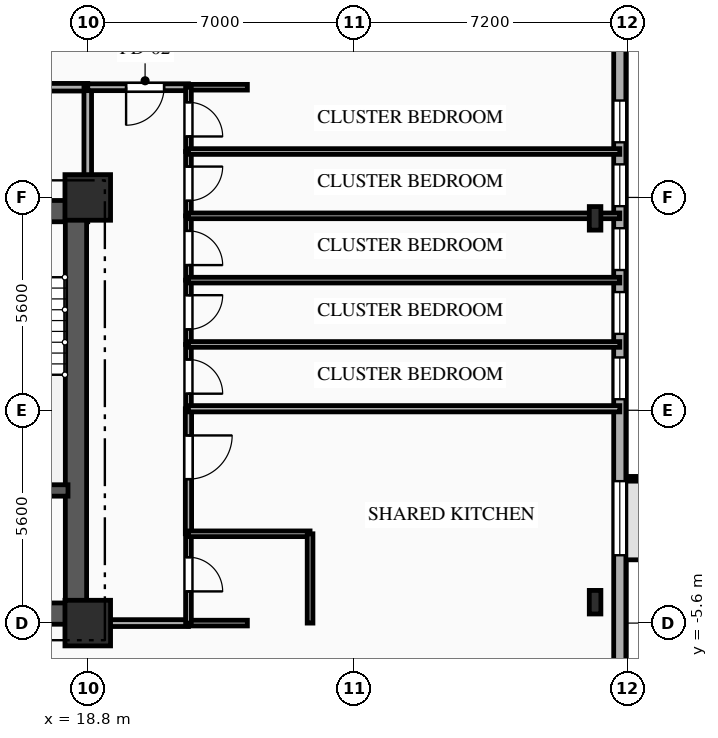
"""IFC4 building model, lengths in metres.
Left out: names, types, materials, properties, quantities, classifications, styles, units other than length and angle.
Written with IfcOpenShell. Run it as: python <this file> out.ifc"""

import sys

from ifc_helpers import new_model, si_unit, direction, frame, frame_2d, origin, origin_2d, place, context, subcontext, project, spatial, rectangle, i_section, extrude, element, fill, save


model = new_model("IFC4")
c1 = context("Model", 3, precision=1e-05, world=origin(), true_north=direction((0.0, 1.0)))
c2 = subcontext(c1, "Body", "Model", "MODEL_VIEW")
j1 = project(units=[si_unit("LENGTHUNIT", "METRE"), si_unit("PLANEANGLEUNIT", "RADIAN")], contexts=[c1])
p1 = place(None, origin())
s1 = spatial("IfcSite", under=j1, at=p1, CompositionType="ELEMENT")
p2 = place(p1, origin())
s2 = spatial("IfcBuilding", under=s1, at=p2, CompositionType="ELEMENT")
p3 = place(p2, frame((0.0, 0.0, 50.45)))
s3 = spatial("IfcBuildingStorey", under=s2, at=p3, CompositionType="ELEMENT", Elevation=50.45)
for number, where, z_axis, x_axis in (
    (1, (18.8, -5.6, 0.0), (0.0, 0.0, 1.0), (1.0, 0.0, 0.0)),
    (2, (18.8, 5.6, 0.0), (0.0, 0.0, 1.0), (1.0, 0.0, 0.0)),
):
    element("IfcColumn", number, at=place(p3, frame(where, z_axis=z_axis, x_axis=x_axis)), inside=s3, PredefinedType="COLUMN", context=c2, shape_type="SweptSolid", body=[
        extrude(rectangle(XDim=1.2, YDim=1.2, at=origin_2d()), origin(), (0.0, 0.0, 1.0), 3.35),
    ])
for number, where, z_axis, x_axis in (
    (3, (32.15, -5.05, 0.0), (0.0, 0.0, 1.0), (1.0, 0.0, 0.0)),
    (4, (32.15, 5.05, 0.0), (0.0, 0.0, 1.0), (1.0, 0.0, 0.0)),
):
    element("IfcColumn", number, at=place(p3, frame(where, z_axis=z_axis, x_axis=x_axis)), inside=s3, PredefinedType="COLUMN", context=c2, shape_type="SweptSolid", body=[
        extrude(i_section(OverallWidth=0.305, OverallDepth=0.62, WebThickness=0.021, FlangeThickness=0.04, FilletRadius=0.027, at=origin_2d()), origin(), (0.0, 0.0, 1.0), 3.35),
    ])
p4 = place(p3, frame((32.8, 15.8, 0.0), z_axis=(0.0, 0.0, 1.0), x_axis=(0.0, -1.0, 0.0)))
e5 = element("IfcWall", 5, at=p4, inside=s3, PredefinedType="SOLIDWALL", context=c2, shape_type="SweptSolid", body=[
    extrude(rectangle(XDim=31.6, YDim=0.32, at=frame_2d((15.8, 0.0))), origin(), (0.0, 0.0, 1.0), 3.035),
])
p5 = place(p4, frame((7.65, 0.0, 0.85)))
e6 = element("IfcOpeningElement", 6, at=p5, cuts=e5, PredefinedType="OPENING", context=c2, shape_type="SweptSolid", body=[
    extrude(rectangle(XDim=1.1, YDim=1.85, at=frame_2d((0.55, 0.925))), frame((0.0, 0.17, 0.0), z_axis=(0.0, -1.0, 0.0), x_axis=(1.0, 0.0, 0.0)), (0.0, 0.0, 1.0), 0.34),
])
p6 = place(p4, frame((9.33, 0.0, 0.85)))
e7 = element("IfcOpeningElement", 7, at=p6, cuts=e5, PredefinedType="OPENING", context=c2, shape_type="SweptSolid", body=[
    extrude(rectangle(XDim=1.1, YDim=1.85, at=frame_2d((0.55, 0.925))), frame((0.0, 0.17, 0.0), z_axis=(0.0, -1.0, 0.0), x_axis=(1.0, 0.0, 0.0)), (0.0, 0.0, 1.0), 0.34),
])
p7 = place(p4, frame((11.01, 0.0, 0.85)))
e8 = element("IfcOpeningElement", 8, at=p7, cuts=e5, PredefinedType="OPENING", context=c2, shape_type="SweptSolid", body=[
    extrude(rectangle(XDim=1.1, YDim=1.85, at=frame_2d((0.55, 0.925))), frame((0.0, 0.17, 0.0), z_axis=(0.0, -1.0, 0.0), x_axis=(1.0, 0.0, 0.0)), (0.0, 0.0, 1.0), 0.34),
])
p8 = place(p4, frame((12.69, 0.0, 0.85)))
e9 = element("IfcOpeningElement", 9, at=p8, cuts=e5, PredefinedType="OPENING", context=c2, shape_type="SweptSolid", body=[
    extrude(rectangle(XDim=1.1, YDim=1.85, at=frame_2d((0.55, 0.925))), frame((0.0, 0.17, 0.0), z_axis=(0.0, -1.0, 0.0), x_axis=(1.0, 0.0, 0.0)), (0.0, 0.0, 1.0), 0.34),
])
p9 = place(p4, frame((14.41, 0.0, 0.85)))
e10 = element("IfcOpeningElement", 10, at=p9, cuts=e5, PredefinedType="OPENING", context=c2, shape_type="SweptSolid", body=[
    extrude(rectangle(XDim=1.1, YDim=1.85, at=frame_2d((0.55, 0.925))), frame((0.0, 0.17, 0.0), z_axis=(0.0, -1.0, 0.0), x_axis=(1.0, 0.0, 0.0)), (0.0, 0.0, 1.0), 0.34),
])
p10 = place(p4, frame((17.665, 0.0, 0.85)))
e11 = element("IfcOpeningElement", 11, at=p10, cuts=e5, PredefinedType="OPENING", context=c2, shape_type="SweptSolid", body=[
    extrude(rectangle(XDim=1.95, YDim=1.85, at=frame_2d((0.975, 0.925))), frame((0.0, 0.17, 0.0), z_axis=(0.0, -1.0, 0.0), x_axis=(1.0, 0.0, 0.0)), (0.0, 0.0, 1.0), 0.34),
])
p11 = place(p3, frame((9.2, 5.24, 0.0), z_axis=(0.0, 0.0, 1.0), x_axis=(1.0, 0.0, 0.0)))
e12 = element("IfcWall", 12, at=p11, inside=s3, PredefinedType="SHEAR", context=c2, shape_type="SweptSolid", body=[
    extrude(rectangle(XDim=9.6, YDim=0.56, at=frame_2d((4.8, 0.0))), origin(), (0.0, 0.0, 1.0), 3.035),
])
p12 = place(p11, frame((6.95, 0.0, 0.0)))
e13 = element("IfcOpeningElement", 13, at=p12, cuts=e12, PredefinedType="OPENING", context=c2, shape_type="SweptSolid", body=[
    extrude(rectangle(XDim=1.1, YDim=2.15, at=frame_2d((0.55, 1.075))), frame((0.0, 0.29, 0.0), z_axis=(0.0, -1.0, 0.0), x_axis=(1.0, 0.0, 0.0)), (0.0, 0.0, 1.0), 0.58),
])
p13 = place(p11, frame((3.775, 0.0, 0.0)))
e14 = element("IfcOpeningElement", 14, at=p13, cuts=e12, PredefinedType="OPENING", context=c2, shape_type="SweptSolid", body=[
    extrude(rectangle(XDim=1.05, YDim=2.1, at=frame_2d((0.525, 1.05))), frame((0.0, 0.29, 0.0), z_axis=(0.0, -1.0, 0.0), x_axis=(1.0, 0.0, 0.0)), (0.0, 0.0, 1.0), 0.58),
])
p14 = place(p3, frame((9.2, -5.35, 0.0), z_axis=(0.0, 0.0, 1.0), x_axis=(1.0, 0.0, 0.0)))
e15 = element("IfcWall", 15, at=p14, inside=s3, PredefinedType="SHEAR", context=c2, shape_type="SweptSolid", body=[
    extrude(rectangle(XDim=9.6, YDim=0.56, at=frame_2d((4.8, 0.0))), origin(), (0.0, 0.0, 1.0), 3.035),
])
p15 = place(p14, frame((7.65, 0.0, 0.0)))
e16 = element("IfcOpeningElement", 16, at=p15, cuts=e15, PredefinedType="OPENING", context=c2, shape_type="SweptSolid", body=[
    extrude(rectangle(XDim=0.9, YDim=2.1, at=frame_2d((0.45, 1.05))), frame((0.0, 0.29, 0.0), z_axis=(0.0, -1.0, 0.0), x_axis=(1.0, 0.0, 0.0)), (0.0, 0.0, 1.0), 0.58),
])
p16 = place(p3, frame((18.49, -5.05, 0.0), z_axis=(0.0, 0.0, 1.0), x_axis=(0.0, 1.0, 0.0)))
e17 = element("IfcWall", 17, at=p16, inside=s3, PredefinedType="SHEAR", context=c2, shape_type="SweptSolid", body=[
    extrude(rectangle(XDim=10.1, YDim=0.56, at=frame_2d((5.05, 0.0))), origin(), (0.0, 0.0, 1.0), 3.035),
])
p17 = place(p3, frame((15.1, -2.11, 0.0), z_axis=(0.0, 0.0, 1.0), x_axis=(1.0, 0.0, 0.0)))
e18 = element("IfcWall", 18, at=p17, inside=s3, PredefinedType="SHEAR", context=c2, shape_type="SweptSolid", body=[
    extrude(rectangle(XDim=3.18, YDim=0.3, at=frame_2d((1.59, 0.0))), origin(), (0.0, 0.0, 1.0), 3.035),
])
p18 = place(p3, frame((18.8, 8.5, 0.0), z_axis=(0.0, 0.0, 1.0), x_axis=(-1.0, 0.0, 0.0)))
e19 = element("IfcWall", 19, at=p18, inside=s3, PredefinedType="PARTITIONING", context=c2, shape_type="SweptSolid", body=[
    extrude(rectangle(XDim=6.8, YDim=0.2, at=frame_2d((3.4, 0.0))), origin(), (0.0, 0.0, 1.0), 3.035),
])
p19 = place(p18, frame((3.985, 0.0, 0.0)))
e20 = element("IfcOpeningElement", 20, at=p19, cuts=e19, PredefinedType="OPENING", context=c2, shape_type="SweptSolid", body=[
    extrude(rectangle(XDim=1.1, YDim=2.15, at=frame_2d((0.55, 1.075))), frame((0.0, 0.11, 0.0), z_axis=(0.0, -1.0, 0.0), x_axis=(1.0, 0.0, 0.0)), (0.0, 0.0, 1.0), 0.22),
])
p20 = place(p3, frame((18.8, 5.6, 0.0), z_axis=(0.0, 0.0, 1.0), x_axis=(0.0, 1.0, 0.0)))
e21 = element("IfcWall", 21, at=p20, inside=s3, PredefinedType="PARTITIONING", context=c2, shape_type="SweptSolid", body=[
    extrude(rectangle(XDim=2.9, YDim=0.2, at=frame_2d((1.45, 0.0))), origin(), (0.0, 0.0, 1.0), 2.52),
])
p21 = place(p3, frame((21.45, 8.5, 0.0), z_axis=(0.0, 0.0, 1.0), x_axis=(-1.0, 0.0, 0.0)))
e22 = element("IfcWall", 22, at=p21, inside=s3, PredefinedType="PARTITIONING", context=c2, shape_type="SweptSolid", body=[
    extrude(rectangle(XDim=2.65, YDim=0.18, at=frame_2d((1.325, 0.0))), origin(), (0.0, 0.0, 1.0), 3.035),
])
p22 = place(p21, frame((0.641, 0.0, 0.0)))
e23 = element("IfcOpeningElement", 23, at=p22, cuts=e22, PredefinedType="OPENING", context=c2, shape_type="SweptSolid", body=[
    extrude(rectangle(XDim=1.0, YDim=2.15, at=frame_2d((0.5, 1.075))), frame((0.0, 0.1, 0.0), z_axis=(0.0, -1.0, 0.0), x_axis=(1.0, 0.0, 0.0)), (0.0, 0.0, 1.0), 0.2),
])
p23 = place(p3, frame((23.0, 8.5, 0.0), z_axis=(0.0, 0.0, 1.0), x_axis=(-1.0, 0.0, 0.0)))
e24 = element("IfcWall", 24, at=p23, inside=s3, PredefinedType="PARTITIONING", context=c2, shape_type="SweptSolid", body=[
    extrude(rectangle(XDim=1.55, YDim=0.15, at=frame_2d((0.775, 0.0))), origin(), (0.0, 0.0, 1.0), 3.035),
])
p24 = place(p3, frame((18.8, -5.6, 0.0), z_axis=(0.0, 0.0, 1.0), x_axis=(1.0, 0.0, 0.0)))
e25 = element("IfcWall", 25, at=p24, inside=s3, PredefinedType="PARTITIONING", context=c2, shape_type="SweptSolid", body=[
    extrude(rectangle(XDim=2.65, YDim=0.18, at=frame_2d((1.325, 0.0))), origin(), (0.0, 0.0, 1.0), 3.035),
])
p25 = place(p3, frame((21.45, -5.6, 0.0), z_axis=(0.0, 0.0, 1.0), x_axis=(1.0, 0.0, 0.0)))
e26 = element("IfcWall", 26, at=p25, inside=s3, PredefinedType="PLUMBINGWALL", context=c2, shape_type="SweptSolid", body=[
    extrude(rectangle(XDim=1.55, YDim=0.15, at=frame_2d((0.775, 0.0))), origin(), (0.0, 0.0, 1.0), 3.035),
])
p26 = place(p3, frame((21.45, -3.25, 0.0), z_axis=(0.0, 0.0, 1.0), x_axis=(0.0, -1.0, 0.0)))
e27 = element("IfcWall", 27, at=p26, inside=s3, PredefinedType="PLUMBINGWALL", context=c2, shape_type="SweptSolid", body=[
    extrude(rectangle(XDim=2.35, YDim=0.15, at=frame_2d((1.175, 0.0))), origin(), (0.0, 0.0, 1.0), 3.035),
])
p27 = place(p26, frame((0.616, 0.0, 0.0)))
e28 = element("IfcOpeningElement", 28, at=p27, cuts=e27, PredefinedType="OPENING", context=c2, shape_type="SweptSolid", body=[
    extrude(rectangle(XDim=0.9, YDim=2.1, at=frame_2d((0.45, 1.05))), frame((0.0, 0.085, 0.0), z_axis=(0.0, -1.0, 0.0), x_axis=(1.0, 0.0, 0.0)), (0.0, 0.0, 1.0), 0.17),
])
p28 = place(p3, frame((21.45, 0.04, 0.0), z_axis=(0.0, 0.0, 1.0), x_axis=(0.0, -1.0, 0.0)))
e29 = element("IfcWall", 29, at=p28, inside=s3, PredefinedType="PARTITIONING", context=c2, shape_type="SweptSolid", body=[
    extrude(rectangle(XDim=3.29, YDim=0.165, at=frame_2d((1.645, 0.0))), origin(), (0.0, 0.0, 1.0), 3.035),
])
p29 = place(p28, frame((0.702, 0.0, 0.0)))
e30 = element("IfcOpeningElement", 30, at=p29, cuts=e29, PredefinedType="OPENING", context=c2, shape_type="SweptSolid", body=[
    extrude(rectangle(XDim=1.15, YDim=2.15, at=frame_2d((0.575, 1.075))), frame((0.0, 0.093, 0.0), z_axis=(0.0, -1.0, 0.0), x_axis=(1.0, 0.0, 0.0)), (0.0, 0.0, 1.0), 0.185),
])
p30 = place(p3, frame((21.45, 1.732, 0.0), z_axis=(0.0, 0.0, 1.0), x_axis=(0.0, -1.0, 0.0)))
e31 = element("IfcWall", 31, at=p30, inside=s3, PredefinedType="PARTITIONING", context=c2, shape_type="SweptSolid", body=[
    extrude(rectangle(XDim=1.692, YDim=0.15, at=frame_2d((0.846, 0.0))), origin(), (0.0, 0.0, 1.0), 3.035),
])
p31 = place(p30, frame((0.396, 0.0, 0.0)))
e32 = element("IfcOpeningElement", 32, at=p31, cuts=e31, PredefinedType="OPENING", context=c2, shape_type="SweptSolid", body=[
    extrude(rectangle(XDim=0.9, YDim=2.1, at=frame_2d((0.45, 1.05))), frame((0.0, 0.085, 0.0), z_axis=(0.0, -1.0, 0.0), x_axis=(1.0, 0.0, 0.0)), (0.0, 0.0, 1.0), 0.17),
])
p32 = place(p3, frame((21.45, 3.424, 0.0), z_axis=(0.0, 0.0, 1.0), x_axis=(0.0, -1.0, 0.0)))
e33 = element("IfcWall", 33, at=p32, inside=s3, PredefinedType="PARTITIONING", context=c2, shape_type="SweptSolid", body=[
    extrude(rectangle(XDim=1.692, YDim=0.15, at=frame_2d((0.846, 0.0))), origin(), (0.0, 0.0, 1.0), 3.035),
])
p33 = place(p32, frame((0.396, 0.0, 0.0)))
e34 = element("IfcOpeningElement", 34, at=p33, cuts=e33, PredefinedType="OPENING", context=c2, shape_type="SweptSolid", body=[
    extrude(rectangle(XDim=0.9, YDim=2.1, at=frame_2d((0.45, 1.05))), frame((0.0, 0.085, 0.0), z_axis=(0.0, -1.0, 0.0), x_axis=(1.0, 0.0, 0.0)), (0.0, 0.0, 1.0), 0.17),
])
p34 = place(p3, frame((21.45, 5.116, 0.0), z_axis=(0.0, 0.0, 1.0), x_axis=(0.0, -1.0, 0.0)))
e35 = element("IfcWall", 35, at=p34, inside=s3, PredefinedType="PARTITIONING", context=c2, shape_type="SweptSolid", body=[
    extrude(rectangle(XDim=1.692, YDim=0.15, at=frame_2d((0.846, 0.0))), origin(), (0.0, 0.0, 1.0), 3.035),
])
p35 = place(p34, frame((0.396, 0.0, 0.0)))
e36 = element("IfcOpeningElement", 36, at=p35, cuts=e35, PredefinedType="OPENING", context=c2, shape_type="SweptSolid", body=[
    extrude(rectangle(XDim=0.9, YDim=2.1, at=frame_2d((0.45, 1.05))), frame((0.0, 0.085, 0.0), z_axis=(0.0, -1.0, 0.0), x_axis=(1.0, 0.0, 0.0)), (0.0, 0.0, 1.0), 0.17),
])
p36 = place(p3, frame((21.45, 6.808, 0.0), z_axis=(0.0, 0.0, 1.0), x_axis=(0.0, -1.0, 0.0)))
e37 = element("IfcWall", 37, at=p36, inside=s3, PredefinedType="PARTITIONING", context=c2, shape_type="SweptSolid", body=[
    extrude(rectangle(XDim=1.692, YDim=0.15, at=frame_2d((0.846, 0.0))), origin(), (0.0, 0.0, 1.0), 3.035),
])
p37 = place(p36, frame((0.396, 0.0, 0.0)))
e38 = element("IfcOpeningElement", 38, at=p37, cuts=e37, PredefinedType="OPENING", context=c2, shape_type="SweptSolid", body=[
    extrude(rectangle(XDim=0.9, YDim=2.1, at=frame_2d((0.45, 1.05))), frame((0.0, 0.085, 0.0), z_axis=(0.0, -1.0, 0.0), x_axis=(1.0, 0.0, 0.0)), (0.0, 0.0, 1.0), 0.17),
])
p38 = place(p3, frame((21.45, 8.5, 0.0), z_axis=(0.0, 0.0, 1.0), x_axis=(0.0, -1.0, 0.0)))
e39 = element("IfcWall", 39, at=p38, inside=s3, PredefinedType="PARTITIONING", context=c2, shape_type="SweptSolid", body=[
    extrude(rectangle(XDim=1.692, YDim=0.15, at=frame_2d((0.846, 0.0))), origin(), (0.0, 0.0, 1.0), 3.035),
])
p39 = place(p38, frame((0.396, 0.0, 0.0)))
e40 = element("IfcOpeningElement", 40, at=p39, cuts=e39, PredefinedType="OPENING", context=c2, shape_type="SweptSolid", body=[
    extrude(rectangle(XDim=0.9, YDim=2.1, at=frame_2d((0.45, 1.05))), frame((0.0, 0.085, 0.0), z_axis=(0.0, -1.0, 0.0), x_axis=(1.0, 0.0, 0.0)), (0.0, 0.0, 1.0), 0.17),
])
p40 = place(p3, frame((21.45, -3.25, 0.0), z_axis=(0.0, 0.0, 1.0), x_axis=(1.0, 0.0, 0.0)))
e41 = element("IfcWall", 41, at=p40, inside=s3, PredefinedType="PLUMBINGWALL", context=c2, shape_type="SweptSolid", body=[
    extrude(rectangle(XDim=3.2, YDim=0.15, at=frame_2d((1.6, 0.0))), origin(), (0.0, 0.0, 1.0), 2.52),
])
p41 = place(p3, frame((24.65, -3.25, 0.0), z_axis=(0.0, 0.0, 1.0), x_axis=(0.0, -1.0, 0.0)))
e42 = element("IfcWall", 42, at=p41, inside=s3, PredefinedType="PLUMBINGWALL", context=c2, shape_type="SweptSolid", body=[
    extrude(rectangle(XDim=2.35, YDim=0.15, at=frame_2d((1.175, 0.0))), origin(), (0.0, 0.0, 1.0), 3.035),
])
p42 = place(p3, frame((21.45, 0.04, 0.0), z_axis=(0.0, 0.0, 1.0), x_axis=(1.0, 0.0, 0.0)))
e43 = element("IfcWall", 43, at=p42, inside=s3, PredefinedType="PARTITIONING", context=c2, shape_type="SweptSolid", body=[
    extrude(rectangle(XDim=11.35, YDim=0.165, at=frame_2d((5.675, 0.0))), origin(), (0.0, 0.0, 1.0), 3.035),
])
p43 = place(p3, frame((21.45, 1.732, 0.0), z_axis=(0.0, 0.0, 1.0), x_axis=(1.0, 0.0, 0.0)))
e44 = element("IfcWall", 44, at=p43, inside=s3, PredefinedType="PARTITIONING", context=c2, shape_type="SweptSolid", body=[
    extrude(rectangle(XDim=11.35, YDim=0.15, at=frame_2d((5.675, 0.0))), origin(), (0.0, 0.0, 1.0), 3.035),
])
for number, where, z_axis, x_axis in (
    (45, (21.45, 3.424, 0.0), (0.0, 0.0, 1.0), (1.0, 0.0, 0.0)),
    (46, (21.45, 5.116, 0.0), (0.0, 0.0, 1.0), (1.0, 0.0, 0.0)),
):
    element("IfcWall", number, at=place(p3, frame(where, z_axis=z_axis, x_axis=x_axis)), inside=s3, PredefinedType="PARTITIONING", context=c2, shape_type="SweptSolid", body=[
        extrude(rectangle(XDim=11.35, YDim=0.15, at=frame_2d((5.675, 0.0))), origin(), (0.0, 0.0, 1.0), 2.52),
    ])
p44 = place(p3, frame((21.45, 6.808, 0.0), z_axis=(0.0, 0.0, 1.0), x_axis=(1.0, 0.0, 0.0)))
e47 = element("IfcWall", 47, at=p44, inside=s3, PredefinedType="PARTITIONING", context=c2, shape_type="SweptSolid", body=[
    extrude(rectangle(XDim=11.35, YDim=0.15, at=frame_2d((5.675, 0.0))), origin(), (0.0, 0.0, 1.0), 3.035),
])
p45 = place(p5, origin())
e48 = element("IfcWindow", 48, at=p45, inside=s3, PartitioningType="SINGLE_PANEL", PredefinedType="WINDOW", context=c2, shape_type="SweptSolid", body=[
    extrude(rectangle(XDim=1.1, YDim=1.85, at=frame_2d((0.55, 0.925))), frame((0.0, 0.03, 0.0), z_axis=(0.0, -1.0, 0.0), x_axis=(1.0, 0.0, 0.0)), (0.0, 0.0, 1.0), 0.06),
])
fill(e6, e48)
p46 = place(p6, origin())
e49 = element("IfcWindow", 49, at=p46, inside=s3, PartitioningType="SINGLE_PANEL", PredefinedType="WINDOW", context=c2, shape_type="SweptSolid", body=[
    extrude(rectangle(XDim=1.1, YDim=1.85, at=frame_2d((0.55, 0.925))), frame((0.0, 0.03, 0.0), z_axis=(0.0, -1.0, 0.0), x_axis=(1.0, 0.0, 0.0)), (0.0, 0.0, 1.0), 0.06),
])
fill(e7, e49)
p47 = place(p7, origin())
e50 = element("IfcWindow", 50, at=p47, inside=s3, PartitioningType="SINGLE_PANEL", PredefinedType="WINDOW", context=c2, shape_type="SweptSolid", body=[
    extrude(rectangle(XDim=1.1, YDim=1.85, at=frame_2d((0.55, 0.925))), frame((0.0, 0.03, 0.0), z_axis=(0.0, -1.0, 0.0), x_axis=(1.0, 0.0, 0.0)), (0.0, 0.0, 1.0), 0.06),
])
fill(e8, e50)
p48 = place(p8, origin())
e51 = element("IfcWindow", 51, at=p48, inside=s3, PartitioningType="SINGLE_PANEL", PredefinedType="WINDOW", context=c2, shape_type="SweptSolid", body=[
    extrude(rectangle(XDim=1.1, YDim=1.85, at=frame_2d((0.55, 0.925))), frame((0.0, 0.03, 0.0), z_axis=(0.0, -1.0, 0.0), x_axis=(1.0, 0.0, 0.0)), (0.0, 0.0, 1.0), 0.06),
])
fill(e9, e51)
p49 = place(p9, origin())
e52 = element("IfcWindow", 52, at=p49, inside=s3, PartitioningType="SINGLE_PANEL", PredefinedType="WINDOW", context=c2, shape_type="SweptSolid", body=[
    extrude(rectangle(XDim=1.1, YDim=1.85, at=frame_2d((0.55, 0.925))), frame((0.0, 0.03, 0.0), z_axis=(0.0, -1.0, 0.0), x_axis=(1.0, 0.0, 0.0)), (0.0, 0.0, 1.0), 0.06),
])
fill(e10, e52)
p50 = place(p10, origin())
e53 = element("IfcWindow", 53, at=p50, inside=s3, PartitioningType="SINGLE_PANEL", PredefinedType="WINDOW", context=c2, shape_type="SweptSolid", body=[
    extrude(rectangle(XDim=1.95, YDim=1.85, at=frame_2d((0.975, 0.925))), frame((0.0, 0.03, 0.0), z_axis=(0.0, -1.0, 0.0), x_axis=(1.0, 0.0, 0.0)), (0.0, 0.0, 1.0), 0.06),
])
fill(e11, e53)
p51 = place(p22, origin())
e54 = element("IfcDoor", 54, at=p51, inside=s3, OperationType="SINGLE_SWING_RIGHT", PredefinedType="DOOR", context=c2, shape_type="SweptSolid", body=[
    extrude(rectangle(XDim=1.0, YDim=2.15, at=frame_2d((0.5, 1.075))), frame((0.0, 0.025, 0.0), z_axis=(0.0, -1.0, 0.0), x_axis=(1.0, 0.0, 0.0)), (0.0, 0.0, 1.0), 0.05),
])
fill(e23, e54)
p52 = place(p27, origin())
e55 = element("IfcDoor", 55, at=p52, inside=s3, OperationType="SINGLE_SWING_RIGHT", PredefinedType="DOOR", context=c2, shape_type="SweptSolid", body=[
    extrude(rectangle(XDim=0.9, YDim=2.1, at=frame_2d((0.45, 1.05))), frame((0.0, 0.025, 0.0), z_axis=(0.0, -1.0, 0.0), x_axis=(1.0, 0.0, 0.0)), (0.0, 0.0, 1.0), 0.05),
])
fill(e28, e55)
p53 = place(p29, origin())
e56 = element("IfcDoor", 56, at=p53, inside=s3, OperationType="SINGLE_SWING_LEFT", PredefinedType="DOOR", context=c2, shape_type="SweptSolid", body=[
    extrude(rectangle(XDim=1.15, YDim=2.15, at=frame_2d((0.575, 1.075))), frame((0.0, 0.025, 0.0), z_axis=(0.0, -1.0, 0.0), x_axis=(1.0, 0.0, 0.0)), (0.0, 0.0, 1.0), 0.05),
])
fill(e30, e56)
p54 = place(p31, origin())
e57 = element("IfcDoor", 57, at=p54, inside=s3, OperationType="SINGLE_SWING_RIGHT", PredefinedType="DOOR", context=c2, shape_type="SweptSolid", body=[
    extrude(rectangle(XDim=0.9, YDim=2.1, at=frame_2d((0.45, 1.05))), frame((0.0, 0.025, 0.0), z_axis=(0.0, -1.0, 0.0), x_axis=(1.0, 0.0, 0.0)), (0.0, 0.0, 1.0), 0.05),
])
fill(e32, e57)
p55 = place(p33, origin())
e58 = element("IfcDoor", 58, at=p55, inside=s3, OperationType="SINGLE_SWING_LEFT", PredefinedType="DOOR", context=c2, shape_type="SweptSolid", body=[
    extrude(rectangle(XDim=0.9, YDim=2.1, at=frame_2d((0.45, 1.05))), frame((0.0, 0.025, 0.0), z_axis=(0.0, -1.0, 0.0), x_axis=(1.0, 0.0, 0.0)), (0.0, 0.0, 1.0), 0.05),
])
fill(e34, e58)
p56 = place(p35, origin())
e59 = element("IfcDoor", 59, at=p56, inside=s3, OperationType="SINGLE_SWING_RIGHT", PredefinedType="DOOR", context=c2, shape_type="SweptSolid", body=[
    extrude(rectangle(XDim=0.9, YDim=2.1, at=frame_2d((0.45, 1.05))), frame((0.0, 0.025, 0.0), z_axis=(0.0, -1.0, 0.0), x_axis=(1.0, 0.0, 0.0)), (0.0, 0.0, 1.0), 0.05),
])
fill(e36, e59)
p57 = place(p37, origin())
e60 = element("IfcDoor", 60, at=p57, inside=s3, OperationType="SINGLE_SWING_LEFT", PredefinedType="DOOR", context=c2, shape_type="SweptSolid", body=[
    extrude(rectangle(XDim=0.9, YDim=2.1, at=frame_2d((0.45, 1.05))), frame((0.0, 0.025, 0.0), z_axis=(0.0, -1.0, 0.0), x_axis=(1.0, 0.0, 0.0)), (0.0, 0.0, 1.0), 0.05),
])
fill(e38, e60)
p58 = place(p39, origin())
e61 = element("IfcDoor", 61, at=p58, inside=s3, OperationType="SINGLE_SWING_RIGHT", PredefinedType="DOOR", context=c2, shape_type="SweptSolid", body=[
    extrude(rectangle(XDim=0.9, YDim=2.1, at=frame_2d((0.45, 1.05))), frame((0.0, 0.025, 0.0), z_axis=(0.0, -1.0, 0.0), x_axis=(1.0, 0.0, 0.0)), (0.0, 0.0, 1.0), 0.05),
])
fill(e40, e61)
save(model, sys.argv[1])
